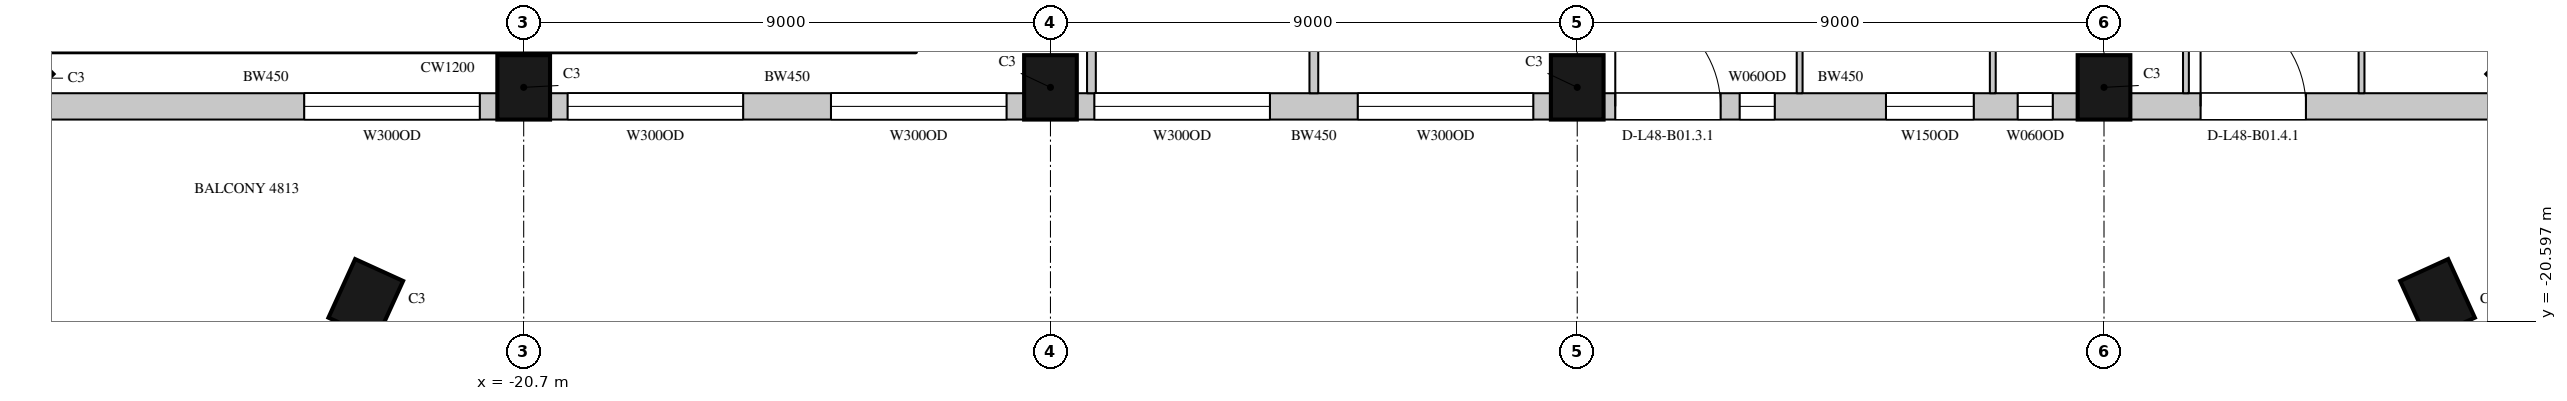
"""IFC4 building model, lengths in metres.
Left out: names, types, materials, properties, quantities, classifications, styles, units other than length and angle.
Written with IfcOpenShell. Run it as: python <this file> out.ifc"""

import sys

from ifc_helpers import new_model, si_unit, direction, frame, frame_2d, origin, origin_2d, place, context, subcontext, project, spatial, rectangle, extrude, element, fill, save


model = new_model("IFC4")
c1 = context("Model", 3, precision=1e-05, world=origin(), true_north=direction((0.0, 1.0)))
c2 = subcontext(c1, "Body", "Model", "MODEL_VIEW")
j1 = project(units=[si_unit("LENGTHUNIT", "METRE"), si_unit("PLANEANGLEUNIT", "RADIAN")], contexts=[c1])
p1 = place(None, origin())
s1 = spatial("IfcSite", under=j1, at=p1, CompositionType="ELEMENT")
p2 = place(p1, origin())
s2 = spatial("IfcBuilding", under=s1, at=p2, CompositionType="ELEMENT")
p3 = place(p2, frame((0.0, 0.0, 217.9)))
s3 = spatial("IfcBuildingStorey", under=s2, at=p3, CompositionType="ELEMENT", Elevation=217.9)
for number, where, z_axis, x_axis in (
    (1, (-29.443, -16.443, 0.0), (0.0, 0.0, 1.0), (0.707, -0.707, 0.0)),
    (2, (-20.7, -16.6, 0.0), (0.0, 0.0, 1.0), (1.0, 0.0, 0.0)),
    (3, (-11.7, -16.6, 0.0), (0.0, 0.0, 1.0), (1.0, 0.0, 0.0)),
    (4, (-2.7, -16.6, 0.0), (0.0, 0.0, 1.0), (1.0, 0.0, 0.0)),
    (5, (6.3, -16.6, 0.0), (0.0, 0.0, 1.0), (1.0, 0.0, 0.0)),
    (6, (13.543, -16.443, 0.0), (0.0, 0.0, 1.0), (0.707, 0.707, 0.0)),
    (7, (-23.398, -20.221, 0.0), (0.0, 0.0, 1.0), (0.91, -0.415, 0.0)),
    (8, (11.998, -20.221, 0.0), (0.0, 0.0, 1.0), (0.91, 0.415, 0.0)),
):
    element("IfcColumn", number, at=place(p3, frame(where, z_axis=z_axis, x_axis=x_axis)), inside=s3, PredefinedType="COLUMN", context=c2, shape_type="SweptSolid", body=[
        extrude(rectangle(XDim=0.9, YDim=1.1, at=origin_2d()), origin(), (0.0, 0.0, 1.0), 4.1),
    ])
p4 = place(p3, frame((-29.064, -16.925, 0.0), z_axis=(0.0, 0.0, 1.0), x_axis=(1.0, 0.0, 0.0)))
e9 = element("IfcWall", 9, at=p4, inside=s3, PredefinedType="SOLIDWALL", context=c2, shape_type="SweptSolid", body=[
    extrude(rectangle(XDim=7.914, YDim=0.45, at=frame_2d((3.957, 0.0))), origin(), (0.0, 0.0, 1.0), 3.8),
])
p5 = place(p4, frame((4.614, 0.0, 1.05)))
e10 = element("IfcOpeningElement", 10, at=p5, cuts=e9, PredefinedType="OPENING", context=c2, shape_type="SweptSolid", body=[
    extrude(rectangle(XDim=3.0, YDim=2.4, at=frame_2d((1.5, 1.2))), frame((0.0, 0.235, 0.0), z_axis=(0.0, -1.0, 0.0), x_axis=(1.0, 0.0, 0.0)), (0.0, 0.0, 1.0), 0.47),
])
p6 = place(p3, frame((-20.25, -16.925, 0.0), z_axis=(0.0, 0.0, 1.0), x_axis=(1.0, 0.0, 0.0)))
e11 = element("IfcWall", 11, at=p6, inside=s3, PredefinedType="SOLIDWALL", context=c2, shape_type="SweptSolid", body=[
    extrude(rectangle(XDim=8.1, YDim=0.45, at=frame_2d((4.05, 0.0))), origin(), (0.0, 0.0, 1.0), 3.8),
])
p7 = place(p6, frame((0.3, 0.0, 1.05)))
e12 = element("IfcOpeningElement", 12, at=p7, cuts=e11, PredefinedType="OPENING", context=c2, shape_type="SweptSolid", body=[
    extrude(rectangle(XDim=3.0, YDim=2.4, at=frame_2d((1.5, 1.2))), frame((0.0, 0.235, 0.0), z_axis=(0.0, -1.0, 0.0), x_axis=(1.0, 0.0, 0.0)), (0.0, 0.0, 1.0), 0.47),
])
p8 = place(p6, frame((4.8, 0.0, 1.05)))
e13 = element("IfcOpeningElement", 13, at=p8, cuts=e11, PredefinedType="OPENING", context=c2, shape_type="SweptSolid", body=[
    extrude(rectangle(XDim=3.0, YDim=2.4, at=frame_2d((1.5, 1.2))), frame((0.0, 0.235, 0.0), z_axis=(0.0, -1.0, 0.0), x_axis=(1.0, 0.0, 0.0)), (0.0, 0.0, 1.0), 0.47),
])
p9 = place(p3, frame((-11.25, -16.925, 0.0), z_axis=(0.0, 0.0, 1.0), x_axis=(1.0, 0.0, 0.0)))
e14 = element("IfcWall", 14, at=p9, inside=s3, PredefinedType="SOLIDWALL", context=c2, shape_type="SweptSolid", body=[
    extrude(rectangle(XDim=8.1, YDim=0.45, at=frame_2d((4.05, 0.0))), origin(), (0.0, 0.0, 1.0), 3.8),
])
p10 = place(p9, frame((0.3, 0.0, 1.05)))
e15 = element("IfcOpeningElement", 15, at=p10, cuts=e14, PredefinedType="OPENING", context=c2, shape_type="SweptSolid", body=[
    extrude(rectangle(XDim=3.0, YDim=2.4, at=frame_2d((1.5, 1.2))), frame((0.0, 0.235, 0.0), z_axis=(0.0, -1.0, 0.0), x_axis=(1.0, 0.0, 0.0)), (0.0, 0.0, 1.0), 0.47),
])
p11 = place(p9, frame((4.8, 0.0, 1.05)))
e16 = element("IfcOpeningElement", 16, at=p11, cuts=e14, PredefinedType="OPENING", context=c2, shape_type="SweptSolid", body=[
    extrude(rectangle(XDim=3.0, YDim=2.4, at=frame_2d((1.5, 1.2))), frame((0.0, 0.235, 0.0), z_axis=(0.0, -1.0, 0.0), x_axis=(1.0, 0.0, 0.0)), (0.0, 0.0, 1.0), 0.47),
])
p12 = place(p3, frame((-2.25, -16.925, 0.0), z_axis=(0.0, 0.0, 1.0), x_axis=(1.0, 0.0, 0.0)))
e17 = element("IfcWall", 17, at=p12, inside=s3, PredefinedType="SOLIDWALL", context=c2, shape_type="SweptSolid", body=[
    extrude(rectangle(XDim=8.1, YDim=0.45, at=frame_2d((4.05, 0.0))), origin(), (0.0, 0.0, 1.0), 3.8),
])
p13 = place(p12, frame((0.2, 0.0, 0.0)))
e18 = element("IfcOpeningElement", 18, at=p13, cuts=e17, PredefinedType="OPENING", context=c2, shape_type="SweptSolid", body=[
    extrude(rectangle(XDim=1.8, YDim=2.4, at=frame_2d((0.9, 1.2))), frame((0.0, 0.235, 0.0), z_axis=(0.0, -1.0, 0.0), x_axis=(1.0, 0.0, 0.0)), (0.0, 0.0, 1.0), 0.47),
])
p14 = place(p12, frame((2.325, 0.0, 1.05)))
e19 = element("IfcOpeningElement", 19, at=p14, cuts=e17, PredefinedType="OPENING", context=c2, shape_type="SweptSolid", body=[
    extrude(rectangle(XDim=0.6, YDim=2.4, at=frame_2d((0.3, 1.2))), frame((0.0, 0.235, 0.0), z_axis=(0.0, -1.0, 0.0), x_axis=(1.0, 0.0, 0.0)), (0.0, 0.0, 1.0), 0.47),
])
p15 = place(p12, frame((4.825, 0.0, 1.05)))
e20 = element("IfcOpeningElement", 20, at=p15, cuts=e17, PredefinedType="OPENING", context=c2, shape_type="SweptSolid", body=[
    extrude(rectangle(XDim=1.5, YDim=2.4, at=frame_2d((0.75, 1.2))), frame((0.0, 0.235, 0.0), z_axis=(0.0, -1.0, 0.0), x_axis=(1.0, 0.0, 0.0)), (0.0, 0.0, 1.0), 0.47),
])
p16 = place(p12, frame((7.075, 0.0, 1.05)))
e21 = element("IfcOpeningElement", 21, at=p16, cuts=e17, PredefinedType="OPENING", context=c2, shape_type="SweptSolid", body=[
    extrude(rectangle(XDim=0.6, YDim=2.4, at=frame_2d((0.3, 1.2))), frame((0.0, 0.235, 0.0), z_axis=(0.0, -1.0, 0.0), x_axis=(1.0, 0.0, 0.0)), (0.0, 0.0, 1.0), 0.47),
])
p17 = place(p3, frame((6.75, -16.925, 0.0), z_axis=(0.0, 0.0, 1.0), x_axis=(1.0, 0.0, 0.0)))
e22 = element("IfcWall", 22, at=p17, inside=s3, PredefinedType="SOLIDWALL", context=c2, shape_type="SweptSolid", body=[
    extrude(rectangle(XDim=6.414, YDim=0.45, at=frame_2d((3.207, 0.0))), origin(), (0.0, 0.0, 1.0), 3.8),
])
p18 = place(p17, frame((1.2, 0.0, 0.0)))
e23 = element("IfcOpeningElement", 23, at=p18, cuts=e22, PredefinedType="OPENING", context=c2, shape_type="SweptSolid", body=[
    extrude(rectangle(XDim=1.8, YDim=2.4, at=frame_2d((0.9, 1.2))), frame((0.0, 0.235, 0.0), z_axis=(0.0, -1.0, 0.0), x_axis=(1.0, 0.0, 0.0)), (0.0, 0.0, 1.0), 0.47),
])
p19 = place(p3, frame((-26.95, -18.0, 0.0), z_axis=(0.0, 0.0, 1.0), x_axis=(1.0, 0.0, 0.0)))
e24 = element("IfcWall", 24, at=p19, inside=s3, PredefinedType="SOLIDWALL", context=c2, shape_type="SweptSolid", body=[
    extrude(rectangle(XDim=2.36, YDim=0.45, at=frame_2d((1.18, 0.0))), origin(), (0.0, 0.0, 1.0), 0.6),
])
for number, where, z_axis, x_axis in (
    (25, (-11.81, -18.0, 0.0), (0.0, 0.0, 1.0), (1.0, 0.0, 0.0)),
    (26, (-7.85, -18.0, 0.0), (0.0, 0.0, 1.0), (1.0, 0.0, 0.0)),
):
    element("IfcWall", number, at=place(p3, frame(where, z_axis=z_axis, x_axis=x_axis)), inside=s3, PredefinedType="SOLIDWALL", context=c2, shape_type="SweptSolid", body=[
        extrude(rectangle(XDim=3.76, YDim=0.45, at=frame_2d((1.88, 0.0))), origin(), (0.0, 0.0, 1.0), 0.6),
    ])
p20 = place(p3, frame((-11.0, -16.7, 0.0), z_axis=(0.0, 0.0, 1.0), x_axis=(0.0, 1.0, 0.0)))
e27 = element("IfcWall", 27, at=p20, inside=s3, PredefinedType="PARTITIONING", context=c2, shape_type="SweptSolid", body=[
    extrude(rectangle(XDim=1.88, YDim=0.15, at=frame_2d((0.94, 0.0))), origin(), (0.0, 0.0, 1.0), 3.8),
])
p21 = place(p3, frame((-7.2, -16.7, 0.0), z_axis=(0.0, 0.0, 1.0), x_axis=(0.0, 1.0, 0.0)))
e28 = element("IfcWall", 28, at=p21, inside=s3, PredefinedType="PARTITIONING", context=c2, shape_type="SweptSolid", body=[
    extrude(rectangle(XDim=4.9, YDim=0.15, at=frame_2d((2.45, 0.0))), origin(), (0.0, 0.0, 1.0), 3.15),
])
for number, where, z_axis, x_axis in (
    (29, (1.1, -16.7, 0.0), (0.0, 0.0, 1.0), (0.0, 1.0, 0.0)),
    (30, (4.4, -16.7, 0.0), (0.0, 0.0, 1.0), (0.0, 1.0, 0.0)),
    (31, (7.7, -16.7, 0.0), (0.0, 0.0, 1.0), (0.0, 1.0, 0.0)),
):
    element("IfcWall", number, at=place(p3, frame(where, z_axis=z_axis, x_axis=x_axis)), inside=s3, PredefinedType="PARTITIONING", context=c2, shape_type="SweptSolid", body=[
        extrude(rectangle(XDim=4.9, YDim=0.1, at=frame_2d((2.45, 0.0))), origin(), (0.0, 0.0, 1.0), 3.8),
    ])
p22 = place(p3, frame((10.7, -16.7, 0.0), z_axis=(0.0, 0.0, 1.0), x_axis=(0.0, 1.0, 0.0)))
e32 = element("IfcWall", 32, at=p22, inside=s3, PredefinedType="PARTITIONING", context=c2, shape_type="SweptSolid", body=[
    extrude(rectangle(XDim=5.0, YDim=0.1, at=frame_2d((2.5, 0.0))), origin(), (0.0, 0.0, 1.0), 3.8),
])
p23 = place(p5, origin())
e33 = element("IfcWindow", 33, at=p23, inside=s3, PartitioningType="SINGLE_PANEL", PredefinedType="WINDOW", context=c2, shape_type="SweptSolid", body=[
    extrude(rectangle(XDim=3.0, YDim=2.4, at=frame_2d((1.5, 1.2))), frame((0.0, 0.135, 0.0), z_axis=(0.0, -1.0, 0.0), x_axis=(1.0, 0.0, 0.0)), (0.0, 0.0, 1.0), 0.06),
])
fill(e10, e33)
p24 = place(p7, origin())
e34 = element("IfcWindow", 34, at=p24, inside=s3, PartitioningType="SINGLE_PANEL", PredefinedType="WINDOW", context=c2, shape_type="SweptSolid", body=[
    extrude(rectangle(XDim=3.0, YDim=2.4, at=frame_2d((1.5, 1.2))), frame((0.0, 0.135, 0.0), z_axis=(0.0, -1.0, 0.0), x_axis=(1.0, 0.0, 0.0)), (0.0, 0.0, 1.0), 0.06),
])
fill(e12, e34)
p25 = place(p8, origin())
e35 = element("IfcWindow", 35, at=p25, inside=s3, PartitioningType="SINGLE_PANEL", PredefinedType="WINDOW", context=c2, shape_type="SweptSolid", body=[
    extrude(rectangle(XDim=3.0, YDim=2.4, at=frame_2d((1.5, 1.2))), frame((0.0, 0.135, 0.0), z_axis=(0.0, -1.0, 0.0), x_axis=(1.0, 0.0, 0.0)), (0.0, 0.0, 1.0), 0.06),
])
fill(e13, e35)
p26 = place(p10, origin())
e36 = element("IfcWindow", 36, at=p26, inside=s3, PartitioningType="SINGLE_PANEL", PredefinedType="WINDOW", context=c2, shape_type="SweptSolid", body=[
    extrude(rectangle(XDim=3.0, YDim=2.4, at=frame_2d((1.5, 1.2))), frame((0.0, 0.135, 0.0), z_axis=(0.0, -1.0, 0.0), x_axis=(1.0, 0.0, 0.0)), (0.0, 0.0, 1.0), 0.06),
])
fill(e15, e36)
p27 = place(p11, origin())
e37 = element("IfcWindow", 37, at=p27, inside=s3, PartitioningType="SINGLE_PANEL", PredefinedType="WINDOW", context=c2, shape_type="SweptSolid", body=[
    extrude(rectangle(XDim=3.0, YDim=2.4, at=frame_2d((1.5, 1.2))), frame((0.0, 0.135, 0.0), z_axis=(0.0, -1.0, 0.0), x_axis=(1.0, 0.0, 0.0)), (0.0, 0.0, 1.0), 0.06),
])
fill(e16, e37)
p28 = place(p13, origin())
e38 = element("IfcDoor", 38, at=p28, inside=s3, OperationType="SLIDING_TO_LEFT", PredefinedType="DOOR", context=c2, shape_type="SweptSolid", body=[
    extrude(rectangle(XDim=1.8, YDim=2.4, at=frame_2d((0.9, 1.2))), frame((0.0, 0.13, 0.0), z_axis=(0.0, -1.0, 0.0), x_axis=(1.0, 0.0, 0.0)), (0.0, 0.0, 1.0), 0.05),
])
fill(e18, e38)
p29 = place(p18, origin())
e39 = element("IfcDoor", 39, at=p29, inside=s3, OperationType="SLIDING_TO_LEFT", PredefinedType="DOOR", context=c2, shape_type="SweptSolid", body=[
    extrude(rectangle(XDim=1.8, YDim=2.4, at=frame_2d((0.9, 1.2))), frame((0.0, 0.13, 0.0), z_axis=(0.0, -1.0, 0.0), x_axis=(1.0, 0.0, 0.0)), (0.0, 0.0, 1.0), 0.05),
])
fill(e23, e39)
p30 = place(p14, origin())
e40 = element("IfcWindow", 40, at=p30, inside=s3, PartitioningType="SINGLE_PANEL", PredefinedType="WINDOW", context=c2, shape_type="SweptSolid", body=[
    extrude(rectangle(XDim=0.6, YDim=2.4, at=frame_2d((0.3, 1.2))), frame((0.0, 0.135, 0.0), z_axis=(0.0, -1.0, 0.0), x_axis=(1.0, 0.0, 0.0)), (0.0, 0.0, 1.0), 0.06),
])
fill(e19, e40)
p31 = place(p15, origin())
e41 = element("IfcWindow", 41, at=p31, inside=s3, PartitioningType="SINGLE_PANEL", PredefinedType="WINDOW", context=c2, shape_type="SweptSolid", body=[
    extrude(rectangle(XDim=1.5, YDim=2.4, at=frame_2d((0.75, 1.2))), frame((0.0, 0.135, 0.0), z_axis=(0.0, -1.0, 0.0), x_axis=(1.0, 0.0, 0.0)), (0.0, 0.0, 1.0), 0.06),
])
fill(e20, e41)
p32 = place(p16, origin())
e42 = element("IfcWindow", 42, at=p32, inside=s3, PartitioningType="SINGLE_PANEL", PredefinedType="WINDOW", context=c2, shape_type="SweptSolid", body=[
    extrude(rectangle(XDim=0.6, YDim=2.4, at=frame_2d((0.3, 1.2))), frame((0.0, 0.135, 0.0), z_axis=(0.0, -1.0, 0.0), x_axis=(1.0, 0.0, 0.0)), (0.0, 0.0, 1.0), 0.06),
])
fill(e21, e42)
save(model, sys.argv[1])
